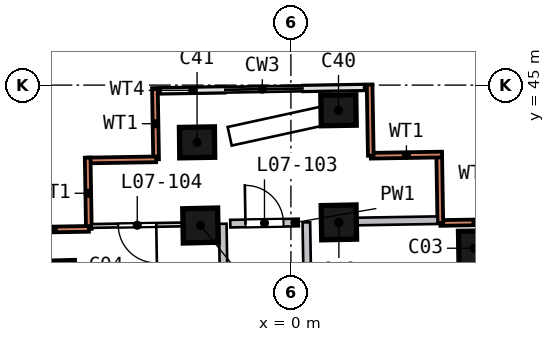
"""IFC4 building model, lengths in metres.
Left out: names, types, materials, properties, quantities, classifications, styles, units other than length and angle.
Written with IfcOpenShell. Run it as: python <this file> out.ifc"""

import sys

from ifc_helpers import new_model, si_unit, direction, frame, frame_2d, origin, origin_2d, place, context, subcontext, project, spatial, rectangle, extrude, element, fill, save


model = new_model("IFC4")
c1 = context("Model", 3, precision=1e-05, world=origin(), true_north=direction((0.0, 1.0)))
c2 = subcontext(c1, "Body", "Model", "MODEL_VIEW")
j1 = project(units=[si_unit("LENGTHUNIT", "METRE"), si_unit("PLANEANGLEUNIT", "RADIAN")], contexts=[c1])
p1 = place(None, origin())
s1 = spatial("IfcSite", under=j1, at=p1, CompositionType="ELEMENT")
p2 = place(p1, origin())
s2 = spatial("IfcBuilding", under=s1, at=p2, CompositionType="ELEMENT")
p3 = place(p2, frame((0.0, 0.0, 39.0)))
s3 = spatial("IfcBuildingStorey", under=s2, at=p3, CompositionType="ELEMENT", Elevation=39.0)
p4 = place(p3, frame((5.059, 40.706, 0.0), z_axis=(-0.190752832, 0.001427453, 0.981637061), x_axis=(-0.015840805, 0.999864255, -0.004532162)))
e1 = element("IfcColumn", 1, at=p4, inside=s3, PredefinedType="COLUMN", context=c2, shape_type="SweptSolid", body=[
    extrude(rectangle(XDim=0.9, YDim=0.8, at=origin_2d()), origin(), (0.0, 0.0, 1.0), 3.25),
])
p5 = place(p3, frame((-5.871, 39.982, 0.0), z_axis=(-0.186896641, -0.049859128, 0.981113507), x_axis=(0.025350334, -0.998623416, -0.045919866)))
e2 = element("IfcColumn", 2, at=p5, inside=s3, PredefinedType="COLUMN", context=c2, shape_type="SweptSolid", body=[
    extrude(rectangle(XDim=0.9, YDim=0.8, at=origin_2d()), origin(), (0.0, 0.0, 1.0), 3.251),
])
p6 = place(p3, frame((1.507, 44.357, 0.0), z_axis=(-0.207080288, -0.015347599, 0.97820356), x_axis=(-0.978181381, -0.013821314, -0.207292444)))
e3 = element("IfcColumn", 3, at=p6, inside=s3, PredefinedType="COLUMN", context=c2, shape_type="SweptSolid", body=[
    extrude(rectangle(XDim=0.9, YDim=0.8, at=origin_2d()), origin(), (0.0, 0.0, 1.0), 3.261),
])
p7 = place(p3, frame((-2.22, 43.534, 0.0), z_axis=(-0.203120629, -0.03280488, 0.978604031), x_axis=(-0.979008807, -0.010390156, -0.203552944)))
e4 = element("IfcColumn", 4, at=p7, inside=s3, PredefinedType="COLUMN", context=c2, shape_type="SweptSolid", body=[
    extrude(rectangle(XDim=0.9, YDim=0.8, at=origin_2d()), origin(), (0.0, 0.0, 1.0), 3.26),
])
p8 = place(p3, frame((1.5, 41.406, 0.0), z_axis=(-0.193840405, -0.015315044, 0.980913527), x_axis=(-0.019055811, 0.999748273, 0.011843452)))
e5 = element("IfcColumn", 5, at=p8, inside=s3, PredefinedType="COLUMN", context=c2, shape_type="SweptSolid", body=[
    extrude(rectangle(XDim=0.9, YDim=0.9, at=origin_2d()), origin(), (0.0, 0.0, 1.0), 3.252),
])
p9 = place(p3, frame((-2.143, 41.345, 0.0), z_axis=(-0.193255586, -0.032421908, 0.980612614), x_axis=(-0.022494025, 0.999337582, 0.028607969)))
e6 = element("IfcColumn", 6, at=p9, inside=s3, PredefinedType="COLUMN", context=c2, shape_type="SweptSolid", body=[
    extrude(rectangle(XDim=0.9, YDim=0.9, at=origin_2d()), origin(), (0.0, 0.0, 1.0), 3.253),
])
p10 = place(p3, frame((5.807, 41.403, 0.0), z_axis=(0.0, 0.0, 1.0), x_axis=(-0.999861104, -0.016666522, 0.0)))
e7 = element("IfcWall", 7, at=p10, inside=s3, PredefinedType="SOLIDWALL", context=c2, shape_type="SweptSolid", body=[
    extrude(rectangle(XDim=1.875, YDim=0.15, at=frame_2d((0.938, 0.0))), origin(), (0.0, 0.0, 1.0), 3.19),
])
p11 = place(p3, frame((3.932, 41.372, 0.0), z_axis=(0.0, 0.0, 1.0), x_axis=(-0.016684694, 0.999860801, 0.0)))
e8 = element("IfcWall", 8, at=p11, inside=s3, PredefinedType="SOLIDWALL", context=c2, shape_type="SweptSolid", body=[
    extrude(rectangle(XDim=1.8, YDim=0.15, at=frame_2d((0.9, 0.0))), origin(), (0.0, 0.0, 1.0), 3.19),
])
for number, where, z_axis, x_axis in (
    (9, (3.977, 43.173, 0.0), (0.0, 0.0, 1.0), (-1.0, -0.017, 0.0)),
    (10, (2.103, 43.142, 0.0), (0.0, 0.0, 1.0), (-0.017, 1.0, 0.0)),
    (11, (-3.578, 44.922, 0.0), (0.0, 0.0, 1.0), (0.017, -1.0, 0.0)),
):
    element("IfcWall", number, at=place(p3, frame(where, z_axis=z_axis, x_axis=x_axis)), inside=s3, PredefinedType="SOLIDWALL", context=c2, shape_type="SweptSolid", body=[
        extrude(rectangle(XDim=1.875, YDim=0.15, at=frame_2d((0.938, 0.0))), origin(), (0.0, 0.0, 1.0), 3.19),
    ])
p12 = place(p3, frame((-3.547, 43.047, 0.0), z_axis=(0.0, 0.0, 1.0), x_axis=(-0.999860839, -0.016682431, 0.0)))
e12 = element("IfcWall", 12, at=p12, inside=s3, PredefinedType="SOLIDWALL", context=c2, shape_type="SweptSolid", body=[
    extrude(rectangle(XDim=1.8, YDim=0.15, at=frame_2d((0.9, 0.0))), origin(), (0.0, 0.0, 1.0), 3.19),
])
for number, where, z_axis, x_axis in (
    (13, (-5.348, 43.092, 0.0), (0.0, 0.0, 1.0), (0.017, -1.0, 0.0)),
    (14, (-5.316, 41.217, 0.0), (0.0, 0.0, 1.0), (-1.0, -0.017, 0.0)),
):
    element("IfcWall", number, at=place(p3, frame(where, z_axis=z_axis, x_axis=x_axis)), inside=s3, PredefinedType="SOLIDWALL", context=c2, shape_type="SweptSolid", body=[
        extrude(rectangle(XDim=1.875, YDim=0.15, at=frame_2d((0.938, 0.0))), origin(), (0.0, 0.0, 1.0), 3.19),
    ])
p13 = place(p3, frame((1.917, 44.939, 0.0), z_axis=(0.0, 0.0, 1.0), x_axis=(-0.999858408, -0.016827482, 0.0)))
e15 = element("IfcWall", 15, at=p13, inside=s3, PredefinedType="SOLIDWALL", context=c2, shape_type="SweptSolid", body=[
    extrude(rectangle(XDim=1.596, YDim=0.15, at=frame_2d((0.798, 0.0))), origin(), (0.0, 0.0, 1.0), 2.425),
])
p14 = place(p3, frame((-1.742, 44.877, 0.0), z_axis=(0.0, 0.0, 1.0), x_axis=(-0.999857893, -0.016858069, 0.0)))
e16 = element("IfcWall", 16, at=p14, inside=s3, PredefinedType="SOLIDWALL", context=c2, shape_type="SweptSolid", body=[
    extrude(rectangle(XDim=1.68, YDim=0.15, at=frame_2d((0.84, 0.0))), origin(), (0.0, 0.0, 1.0), 2.425),
])
p15 = place(p3, frame((-1.397, 17.738, 0.0), z_axis=(0.0, 0.0, 1.0), x_axis=(-0.016757192, 0.999859588, 0.0)))
e17 = element("IfcWall", 17, at=p15, inside=s3, PredefinedType="SOLIDWALL", context=c2, shape_type="SweptSolid", body=[
    extrude(rectangle(XDim=23.617, YDim=0.2, at=frame_2d((11.809, 0.0))), origin(), (0.0, 0.0, 1.0), 3.19),
])
p16 = place(p15, frame((13.05, 0.0, 0.0)))
e18 = element("IfcOpeningElement", 18, at=p16, cuts=e17, PredefinedType="OPENING", context=c2, shape_type="SweptSolid", body=[
    extrude(rectangle(XDim=1.0, YDim=2.1, at=frame_2d((0.5, 1.05))), frame((0.0, 0.11, 0.0), z_axis=(0.0, -1.0, 0.0), x_axis=(1.0, 0.0, 0.0)), (0.0, 0.0, 1.0), 0.22),
])
p17 = place(p3, frame((-1.595, 41.354, 0.0), z_axis=(0.0, 0.0, 1.0), x_axis=(0.999858912, 0.016797521, 0.0)))
e19 = element("IfcWall", 19, at=p17, inside=s3, PredefinedType="SOLIDWALL", context=c2, shape_type="SweptSolid", body=[
    extrude(rectangle(XDim=1.802, YDim=0.2, at=frame_2d((0.901, 0.0))), origin(), (0.0, 0.0, 1.0), 3.19),
])
p18 = place(p17, frame((0.4, 0.0, 0.0)))
e20 = element("IfcOpeningElement", 20, at=p18, cuts=e19, PredefinedType="OPENING", context=c2, shape_type="SweptSolid", body=[
    extrude(rectangle(XDim=1.0, YDim=2.1, at=frame_2d((0.5, 1.05))), frame((0.0, 0.11, 0.0), z_axis=(0.0, -1.0, 0.0), x_axis=(1.0, 0.0, 0.0)), (0.0, 0.0, 1.0), 0.22),
])
p19 = place(p3, frame((0.406, 41.388, 0.0), z_axis=(0.0, 0.0, 1.0), x_axis=(0.016764935, -0.999859459, 0.0)))
e21 = element("IfcWall", 21, at=p19, inside=s3, PredefinedType="SOLIDWALL", context=c2, shape_type="SweptSolid", body=[
    extrude(rectangle(XDim=23.417, YDim=0.2, at=frame_2d((11.708, 0.0))), origin(), (0.0, 0.0, 1.0), 3.19),
])
p20 = place(p19, frame((15.5, 0.0, 0.0)))
e22 = element("IfcOpeningElement", 22, at=p20, cuts=e21, PredefinedType="OPENING", context=c2, shape_type="SweptSolid", body=[
    extrude(rectangle(XDim=1.0, YDim=2.1, at=frame_2d((0.5, 1.05))), frame((0.0, 0.11, 0.0), z_axis=(0.0, -1.0, 0.0), x_axis=(1.0, 0.0, 0.0)), (0.0, 0.0, 1.0), 0.22),
])
p21 = place(p3, frame((0.854, 41.396, 0.0), z_axis=(0.0, 0.0, 1.0), x_axis=(0.999859919, 0.016737457, 0.0)))
e23 = element("IfcWall", 23, at=p21, inside=s3, PredefinedType="SOLIDWALL", context=c2, shape_type="SweptSolid", body=[
    extrude(rectangle(XDim=3.005, YDim=0.2, at=frame_2d((1.502, 0.0))), origin(), (0.0, 0.0, 1.0), 3.19),
])
p22 = place(p3, frame((-1.993, 41.348, 0.0), z_axis=(0.0, 0.0, 1.0), x_axis=(-0.999859865, -0.016740652, 0.0)))
e24 = element("IfcWall", 24, at=p22, inside=s3, PredefinedType="PARTITIONING", context=c2, shape_type="SweptSolid", body=[
    extrude(rectangle(XDim=3.252, YDim=0.1, at=frame_2d((1.626, 0.0))), origin(), (0.0, 0.0, 1.0), 3.19),
])
p23 = place(p22, frame((1.55, 0.0, 0.0)))
e25 = element("IfcOpeningElement", 25, at=p23, cuts=e24, PredefinedType="OPENING", context=c2, shape_type="SweptSolid", body=[
    extrude(rectangle(XDim=1.0, YDim=2.1, at=frame_2d((0.5, 1.05))), frame((0.0, 0.06, 0.0), z_axis=(0.0, -1.0, 0.0), x_axis=(1.0, 0.0, 0.0)), (0.0, 0.0, 1.0), 0.12),
])
p24 = place(p18, origin())
e26 = element("IfcDoor", 26, at=p24, inside=s3, OperationType="SINGLE_SWING_LEFT", PredefinedType="DOOR", context=c2, shape_type="SweptSolid", body=[
    extrude(rectangle(XDim=1.0, YDim=2.1, at=frame_2d((0.5, 1.05))), frame((0.0, 0.025, 0.0), z_axis=(0.0, -1.0, 0.0), x_axis=(1.0, 0.0, 0.0)), (0.0, 0.0, 1.0), 0.05),
])
fill(e20, e26)
p25 = place(p23, origin())
e27 = element("IfcDoor", 27, at=p25, inside=s3, OperationType="SINGLE_SWING_LEFT", PredefinedType="DOOR", context=c2, shape_type="SweptSolid", body=[
    extrude(rectangle(XDim=1.0, YDim=2.1, at=frame_2d((0.5, 1.05))), frame((0.0, 0.025, 0.0), z_axis=(0.0, -1.0, 0.0), x_axis=(1.0, 0.0, 0.0)), (0.0, 0.0, 1.0), 0.05),
])
fill(e25, e27)
save(model, sys.argv[1])
